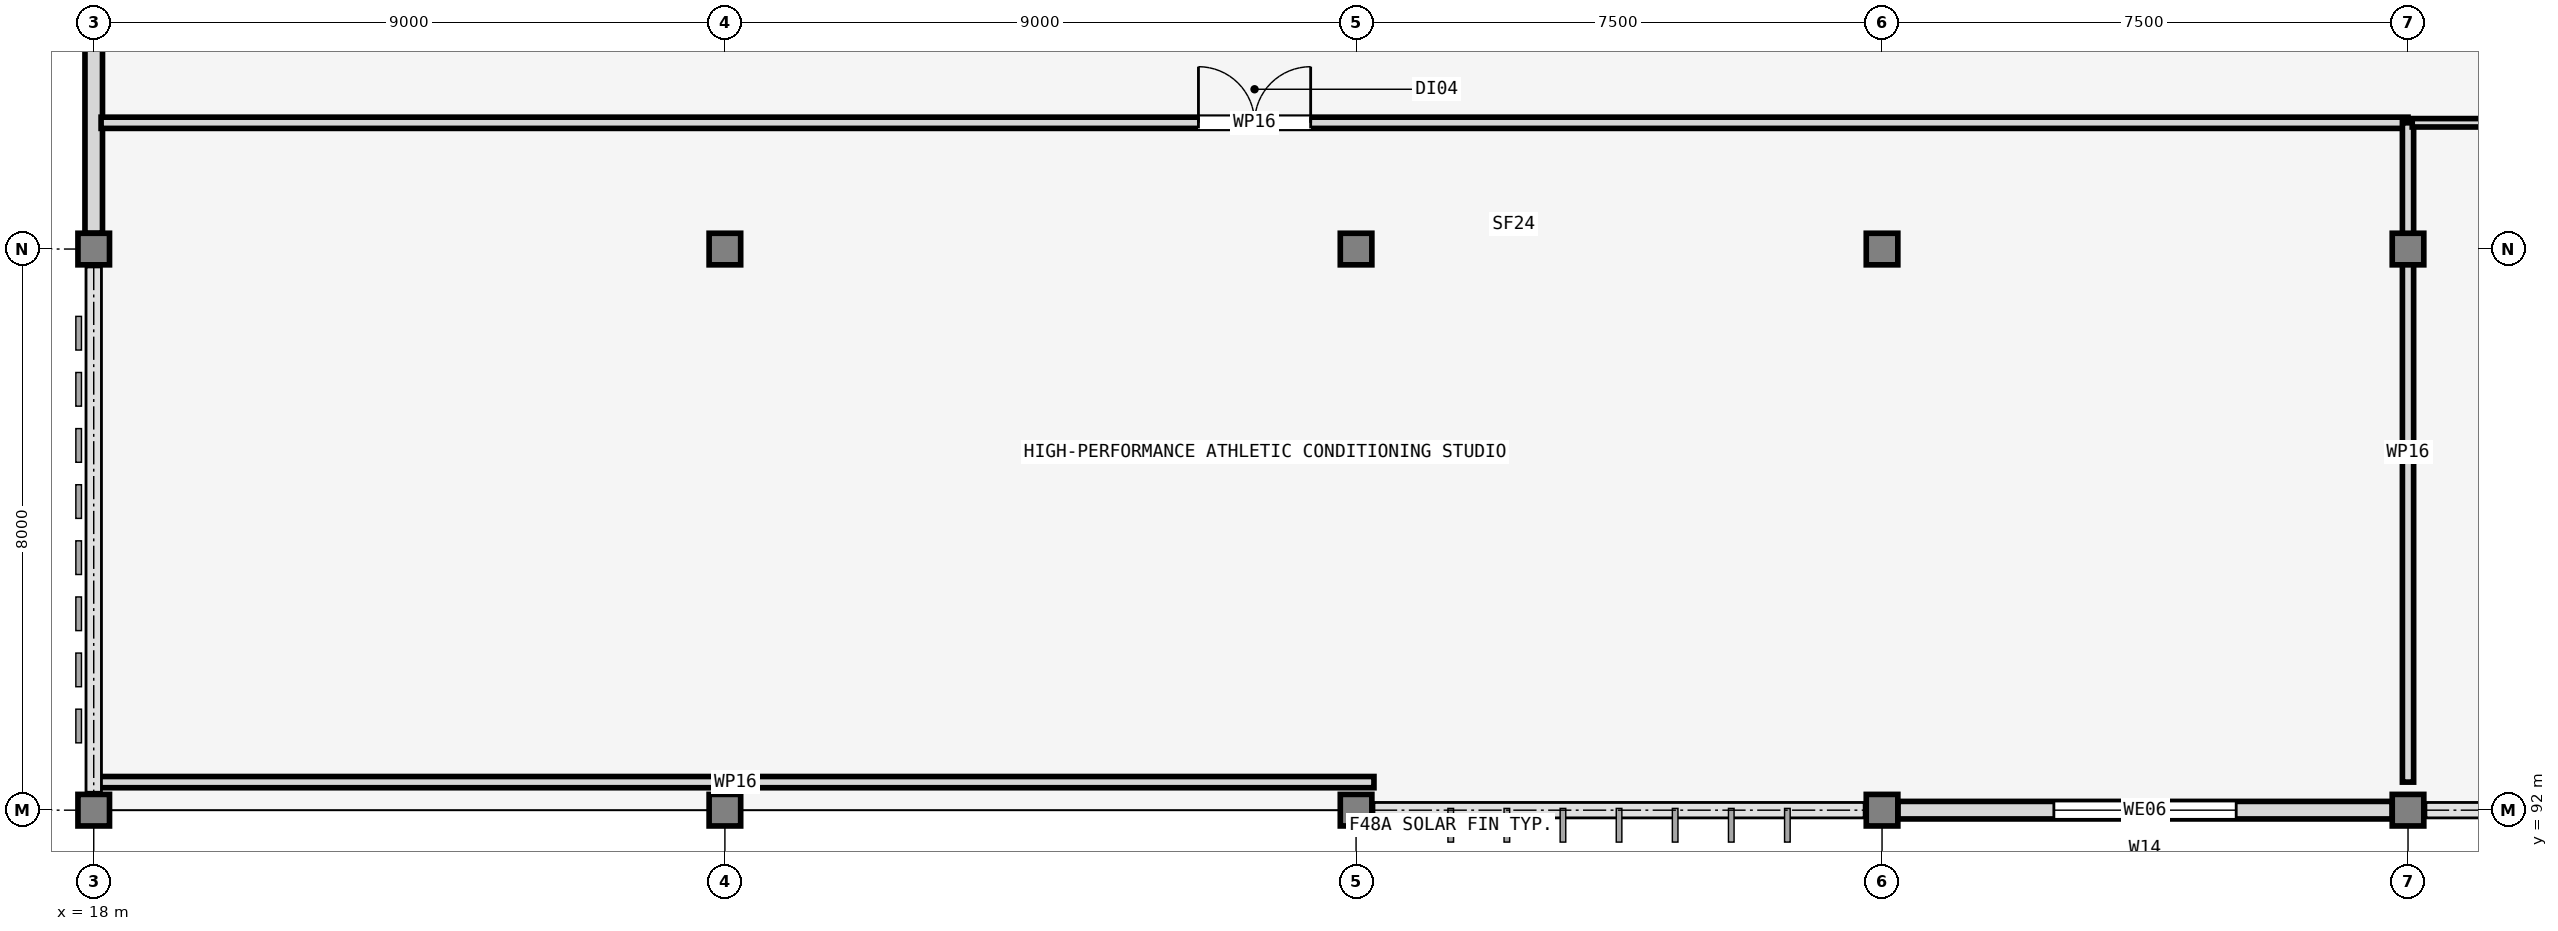
"""IFC4 building model, lengths in metres.
Left out: names, types, materials, properties, quantities, classifications, styles, units other than length and angle.
Written with IfcOpenShell. Run it as: python <this file> out.ifc"""

import sys

from ifc_helpers import new_model, si_unit, direction, frame, frame_2d, origin, origin_2d, place, context, subcontext, project, spatial, rectangle, extrude, element, fill, save


model = new_model("IFC4")
c1 = context("Model", 3, precision=1e-05, world=origin(), true_north=direction((0.0, 1.0)))
c2 = subcontext(c1, "Body", "Model", "MODEL_VIEW")
j1 = project(units=[si_unit("LENGTHUNIT", "METRE"), si_unit("PLANEANGLEUNIT", "RADIAN")], contexts=[c1])
p1 = place(None, origin())
s1 = spatial("IfcSite", under=j1, at=p1, CompositionType="ELEMENT")
p2 = place(p1, origin())
s2 = spatial("IfcBuilding", under=s1, at=p2, CompositionType="ELEMENT")
p3 = place(p2, frame((0.0, 0.0, 17.7)))
s3 = spatial("IfcBuildingStorey", under=s2, at=p3, CompositionType="ELEMENT", Elevation=17.7)
for number, where, z_axis, x_axis in (
    (1, (18.0, 92.0, 0.0), (0.0, 0.0, 1.0), (1.0, 0.0, 0.0)),
    (2, (18.0, 100.0, 0.0), (0.0, 0.0, 1.0), (1.0, 0.0, 0.0)),
    (3, (27.0, 92.0, 0.0), (0.0, 0.0, 1.0), (1.0, 0.0, 0.0)),
    (4, (27.0, 100.0, 0.0), (0.0, 0.0, 1.0), (1.0, 0.0, 0.0)),
    (5, (36.0, 92.0, 0.0), (0.0, 0.0, 1.0), (1.0, 0.0, 0.0)),
    (6, (36.0, 100.0, 0.0), (0.0, 0.0, 1.0), (1.0, 0.0, 0.0)),
    (7, (43.5, 92.0, 0.0), (0.0, 0.0, 1.0), (1.0, 0.0, 0.0)),
    (8, (43.5, 100.0, 0.0), (0.0, 0.0, 1.0), (1.0, 0.0, 0.0)),
    (9, (51.0, 92.0, 0.0), (0.0, 0.0, 1.0), (1.0, 0.0, 0.0)),
    (10, (51.0, 100.0, 0.0), (0.0, 0.0, 1.0), (1.0, 0.0, 0.0)),
):
    element("IfcColumn", number, at=place(p3, frame(where, z_axis=z_axis, x_axis=x_axis)), inside=s3, PredefinedType="COLUMN", context=c2, shape_type="SweptSolid", body=[
        extrude(rectangle(XDim=0.45, YDim=0.45, at=origin_2d()), origin(), (0.0, 0.0, 1.0), 3.96),
    ])
p4 = place(p3, frame((43.725, 92.0, 0.0), z_axis=(0.0, 0.0, 1.0), x_axis=(1.0, 0.0, 0.0)))
e11 = element("IfcWall", 11, at=p4, inside=s3, PredefinedType="SOLIDWALL", context=c2, shape_type="SweptSolid", body=[
    extrude(rectangle(XDim=7.05, YDim=0.25, at=frame_2d((3.525, 0.0))), origin(), (0.0, 0.0, 1.0), 3.67),
])
p5 = place(p4, frame((2.225, 0.0, 0.95)))
e12 = element("IfcOpeningElement", 12, at=p5, cuts=e11, PredefinedType="OPENING", context=c2, shape_type="SweptSolid", body=[
    extrude(rectangle(XDim=2.6, YDim=1.75, at=frame_2d((1.3, 0.875))), frame((0.0, 0.135, 0.0), z_axis=(0.0, -1.0, 0.0), x_axis=(1.0, 0.0, 0.0)), (0.0, 0.0, 1.0), 0.27),
])
p6 = place(p3, frame((18.0, 107.775, 0.0), z_axis=(0.0, 0.0, 1.0), x_axis=(0.0, -1.0, 0.0)))
e13 = element("IfcWall", 13, at=p6, inside=s3, PredefinedType="SOLIDWALL", context=c2, shape_type="SweptSolid", body=[
    extrude(rectangle(XDim=7.55, YDim=0.25, at=frame_2d((3.775, 0.0))), origin(), (0.0, 0.0, 1.0), 3.58),
])
p7 = place(p6, frame((2.925, 0.0, 0.95)))
e14 = element("IfcOpeningElement", 14, at=p7, cuts=e13, PredefinedType="OPENING", context=c2, shape_type="SweptSolid", body=[
    extrude(rectangle(XDim=1.7, YDim=1.55, at=frame_2d((0.85, 0.775))), frame((0.0, 0.135, 0.0), z_axis=(0.0, -1.0, 0.0), x_axis=(1.0, 0.0, 0.0)), (0.0, 0.0, 1.0), 0.27),
])
p8 = place(p3, frame((18.105, 101.8, 0.0), z_axis=(0.0, 0.0, 1.0), x_axis=(1.0, 0.0, 0.0)))
e15 = element("IfcWall", 15, at=p8, inside=s3, PredefinedType="PARTITIONING", context=c2, shape_type="SweptSolid", body=[
    extrude(rectangle(XDim=32.895, YDim=0.16, at=frame_2d((16.448, 0.0))), origin(), (0.0, 0.0, 1.0), 3.15),
])
p9 = place(p8, frame((15.647, 0.0, 0.0)))
e16 = element("IfcOpeningElement", 16, at=p9, cuts=e15, PredefinedType="OPENING", context=c2, shape_type="SweptSolid", body=[
    extrude(rectangle(XDim=1.6, YDim=2.2, at=frame_2d((0.8, 1.1))), frame((0.0, 0.09, 0.0), z_axis=(0.0, -1.0, 0.0), x_axis=(1.0, 0.0, 0.0)), (0.0, 0.0, 1.0), 0.18),
])
p10 = place(p3, frame((51.0, 101.8, 0.0), z_axis=(0.0, 0.0, 1.0), x_axis=(0.0, -1.0, 0.0)))
e17 = element("IfcWall", 17, at=p10, inside=s3, PredefinedType="PARTITIONING", context=c2, shape_type="SweptSolid", body=[
    extrude(rectangle(XDim=9.4, YDim=0.16, at=frame_2d((4.7, 0.0))), origin(), (0.0, 0.0, 1.0), 3.15),
])
p11 = place(p3, frame((36.255, 92.4, 0.0), z_axis=(0.0, 0.0, 1.0), x_axis=(-1.0, 0.0, 0.0)))
e18 = element("IfcWall", 18, at=p11, inside=s3, PredefinedType="PARTITIONING", context=c2, shape_type="SweptSolid", body=[
    extrude(rectangle(XDim=18.207, YDim=0.16, at=frame_2d((9.104, 0.0))), origin(), (0.0, 0.0, 1.0), 3.15),
])
p12 = place(p3, frame((51.06, 101.8, 0.0), z_axis=(0.0, 0.0, 1.0), x_axis=(1.0, 0.0, 0.0)))
e19 = element("IfcWall", 19, at=p12, inside=s3, PredefinedType="PARTITIONING", context=c2, shape_type="SweptSolid", body=[
    extrude(rectangle(XDim=19.94, YDim=0.12, at=frame_2d((9.97, 0.0))), origin(), (0.0, 0.0, 1.0), 3.15),
])
p13 = place(p12, frame((9.47, 0.0, 0.0)))
e20 = element("IfcOpeningElement", 20, at=p13, cuts=e19, PredefinedType="OPENING", context=c2, shape_type="SweptSolid", body=[
    extrude(rectangle(XDim=1.0, YDim=2.1, at=frame_2d((0.5, 1.05))), frame((0.0, 0.07, 0.0), z_axis=(0.0, -1.0, 0.0), x_axis=(1.0, 0.0, 0.0)), (0.0, 0.0, 1.0), 0.14),
])
p14 = place(p5, origin())
e21 = element("IfcWindow", 21, at=p14, inside=s3, PartitioningType="SINGLE_PANEL", PredefinedType="WINDOW", context=c2, shape_type="SweptSolid", body=[
    extrude(rectangle(XDim=2.6, YDim=1.75, at=frame_2d((1.3, 0.875))), frame((0.0, 0.03, 0.0), z_axis=(0.0, -1.0, 0.0), x_axis=(1.0, 0.0, 0.0)), (0.0, 0.0, 1.0), 0.06),
])
fill(e12, e21)
p15 = place(p9, origin())
e22 = element("IfcDoor", 22, at=p15, inside=s3, OperationType="DOUBLE_DOOR_SINGLE_SWING", PredefinedType="DOOR", context=c2, shape_type="SweptSolid", body=[
    extrude(rectangle(XDim=1.6, YDim=2.2, at=frame_2d((0.8, 1.1))), frame((0.0, 0.025, 0.0), z_axis=(0.0, -1.0, 0.0), x_axis=(1.0, 0.0, 0.0)), (0.0, 0.0, 1.0), 0.05),
])
fill(e16, e22)
save(model, sys.argv[1])
